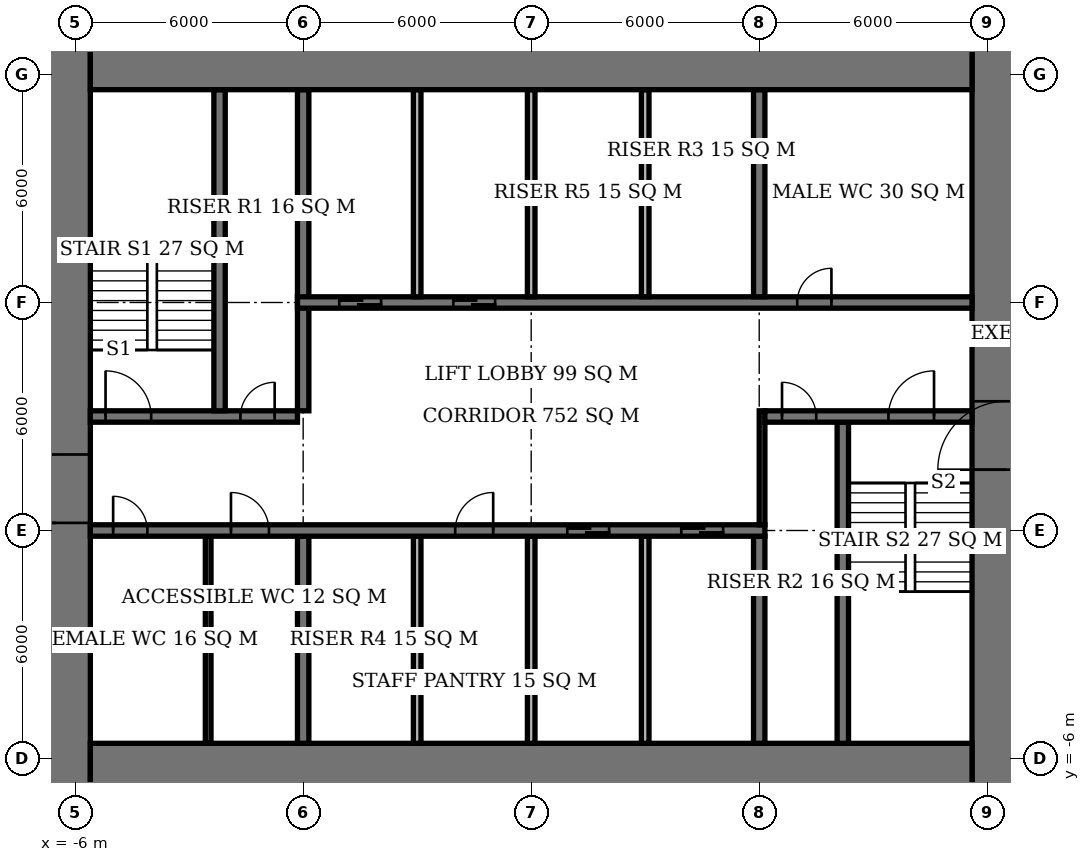
"""IFC4 building model, lengths in metres.
Left out: names, types, materials, properties, quantities, classifications, styles, units other than length and angle.
Written with IfcOpenShell. Run it as: python <this file> out.ifc"""

import sys

from ifc_helpers import new_model, si_unit, direction, frame, frame_2d, origin, place, context, subcontext, project, spatial, rectangle, extrude, element, fill, save


model = new_model("IFC4")
c1 = context("Model", 3, precision=1e-05, world=origin(), true_north=direction((0.0, 1.0)))
c2 = subcontext(c1, "Body", "Model", "MODEL_VIEW")
j1 = project(units=[si_unit("LENGTHUNIT", "METRE"), si_unit("PLANEANGLEUNIT", "RADIAN")], contexts=[c1])
p1 = place(None, origin())
s1 = spatial("IfcSite", under=j1, at=p1, CompositionType="ELEMENT")
p2 = place(p1, origin())
s2 = spatial("IfcBuilding", under=s1, at=p2, CompositionType="ELEMENT")
p3 = place(p2, frame((0.0, 0.0, 284.0)))
s3 = spatial("IfcBuildingStorey", under=s2, at=p3, CompositionType="ELEMENT", Elevation=284.0)
for number, where, z_axis, x_axis in (
    (1, (-5.6, -6.6, 0.0), (0.0, 0.0, 1.0), (1.0, 0.0, 0.0)),
    (2, (-5.6, 12.6, 0.0), (0.0, 0.0, 1.0), (1.0, 0.0, 0.0)),
):
    element("IfcWall", number, at=place(p3, frame(where, z_axis=z_axis, x_axis=x_axis)), inside=s3, PredefinedType="SHEAR", context=c2, shape_type="SweptSolid", body=[
        extrude(rectangle(XDim=23.2, YDim=2.0, at=frame_2d((11.6, 0.0))), origin(), (0.0, 0.0, 1.0), 3.9),
    ])
p4 = place(p3, frame((-6.5, -7.6, 0.0), z_axis=(0.0, 0.0, 1.0), x_axis=(0.0, 1.0, 0.0)))
e3 = element("IfcWall", 3, at=p4, inside=s3, PredefinedType="SHEAR", context=c2, shape_type="SweptSolid", body=[
    extrude(rectangle(XDim=21.2, YDim=1.8, at=frame_2d((10.6, 0.0))), origin(), (0.0, 0.0, 1.0), 3.9),
])
p5 = place(p4, frame((7.8, 0.0, 0.0)))
e4 = element("IfcOpeningElement", 4, at=p5, cuts=e3, PredefinedType="OPENING", context=c2, shape_type="SweptSolid", body=[
    extrude(rectangle(XDim=1.8, YDim=2.4, at=frame_2d((0.9, 1.2))), frame((0.0, 0.91, 0.0), z_axis=(0.0, -1.0, 0.0), x_axis=(1.0, 0.0, 0.0)), (0.0, 0.0, 1.0), 1.82),
])
p6 = place(p3, frame((18.5, -7.6, 0.0), z_axis=(0.0, 0.0, 1.0), x_axis=(0.0, 1.0, 0.0)))
e5 = element("IfcWall", 5, at=p6, inside=s3, PredefinedType="SHEAR", context=c2, shape_type="SweptSolid", body=[
    extrude(rectangle(XDim=21.2, YDim=1.8, at=frame_2d((10.6, 0.0))), origin(), (0.0, 0.0, 1.0), 3.9),
])
p7 = place(p6, frame((9.2, 0.0, 0.0)))
e6 = element("IfcOpeningElement", 6, at=p7, cuts=e5, PredefinedType="OPENING", context=c2, shape_type="SweptSolid", body=[
    extrude(rectangle(XDim=1.8, YDim=2.4, at=frame_2d((0.9, 1.2))), frame((0.0, 0.91, 0.0), z_axis=(0.0, -1.0, 0.0), x_axis=(1.0, 0.0, 0.0)), (0.0, 0.0, 1.0), 1.82),
])
p8 = place(p3, frame((-5.6, 0.0, 0.0), z_axis=(0.0, 0.0, 1.0), x_axis=(1.0, 0.0, 0.0)))
e7 = element("IfcWall", 7, at=p8, inside=s3, PredefinedType="SHEAR", context=c2, shape_type="SweptSolid", body=[
    extrude(rectangle(XDim=17.75, YDim=0.3, at=frame_2d((8.875, 0.0))), origin(), (0.0, 0.0, 1.0), 3.9),
])
p9 = place(p8, frame((0.6, 0.0, 0.0)))
e8 = element("IfcOpeningElement", 8, at=p9, cuts=e7, PredefinedType="OPENING", context=c2, shape_type="SweptSolid", body=[
    extrude(rectangle(XDim=0.9, YDim=2.1, at=frame_2d((0.45, 1.05))), frame((0.0, 0.16, 0.0), z_axis=(0.0, -1.0, 0.0), x_axis=(1.0, 0.0, 0.0)), (0.0, 0.0, 1.0), 0.32),
])
p10 = place(p8, frame((3.7, 0.0, 0.0)))
e9 = element("IfcOpeningElement", 9, at=p10, cuts=e7, PredefinedType="OPENING", context=c2, shape_type="SweptSolid", body=[
    extrude(rectangle(XDim=1.0, YDim=2.1, at=frame_2d((0.5, 1.05))), frame((0.0, 0.16, 0.0), z_axis=(0.0, -1.0, 0.0), x_axis=(1.0, 0.0, 0.0)), (0.0, 0.0, 1.0), 0.32),
])
p11 = place(p8, frame((9.6, 0.0, 0.0)))
e10 = element("IfcOpeningElement", 10, at=p11, cuts=e7, PredefinedType="OPENING", context=c2, shape_type="SweptSolid", body=[
    extrude(rectangle(XDim=1.0, YDim=2.1, at=frame_2d((0.5, 1.05))), frame((0.0, 0.16, 0.0), z_axis=(0.0, -1.0, 0.0), x_axis=(1.0, 0.0, 0.0)), (0.0, 0.0, 1.0), 0.32),
])
p12 = place(p8, frame((12.55, 0.0, 0.0)))
e11 = element("IfcOpeningElement", 11, at=p12, cuts=e7, PredefinedType="OPENING", context=c2, shape_type="SweptSolid", body=[
    extrude(rectangle(XDim=1.1, YDim=2.1, at=frame_2d((0.55, 1.05))), frame((0.0, 0.16, 0.0), z_axis=(0.0, -1.0, 0.0), x_axis=(1.0, 0.0, 0.0)), (0.0, 0.0, 1.0), 0.32),
])
p13 = place(p8, frame((15.55, 0.0, 0.0)))
e12 = element("IfcOpeningElement", 12, at=p13, cuts=e7, PredefinedType="OPENING", context=c2, shape_type="SweptSolid", body=[
    extrude(rectangle(XDim=1.1, YDim=2.1, at=frame_2d((0.55, 1.05))), frame((0.0, 0.16, 0.0), z_axis=(0.0, -1.0, 0.0), x_axis=(1.0, 0.0, 0.0)), (0.0, 0.0, 1.0), 0.32),
])
p14 = place(p3, frame((-5.6, 3.0, 0.0), z_axis=(0.0, 0.0, 1.0), x_axis=(1.0, 0.0, 0.0)))
e13 = element("IfcWall", 13, at=p14, inside=s3, PredefinedType="SHEAR", context=c2, shape_type="SweptSolid", body=[
    extrude(rectangle(XDim=5.45, YDim=0.3, at=frame_2d((2.725, 0.0))), origin(), (0.0, 0.0, 1.0), 3.9),
])
p15 = place(p14, frame((0.4, 0.0, 0.0)))
e14 = element("IfcOpeningElement", 14, at=p15, cuts=e13, PredefinedType="OPENING", context=c2, shape_type="SweptSolid", body=[
    extrude(rectangle(XDim=1.2, YDim=2.1, at=frame_2d((0.6, 1.05))), frame((0.0, 0.16, 0.0), z_axis=(0.0, -1.0, 0.0), x_axis=(1.0, 0.0, 0.0)), (0.0, 0.0, 1.0), 0.32),
])
p16 = place(p14, frame((3.95, 0.0, 0.0)))
e15 = element("IfcOpeningElement", 15, at=p16, cuts=e13, PredefinedType="OPENING", context=c2, shape_type="SweptSolid", body=[
    extrude(rectangle(XDim=0.9, YDim=2.1, at=frame_2d((0.45, 1.05))), frame((0.0, 0.16, 0.0), z_axis=(0.0, -1.0, 0.0), x_axis=(1.0, 0.0, 0.0)), (0.0, 0.0, 1.0), 0.32),
])
p17 = place(p3, frame((12.15, 3.0, 0.0), z_axis=(0.0, 0.0, 1.0), x_axis=(1.0, 0.0, 0.0)))
e16 = element("IfcWall", 16, at=p17, inside=s3, PredefinedType="SHEAR", context=c2, shape_type="SweptSolid", body=[
    extrude(rectangle(XDim=5.45, YDim=0.3, at=frame_2d((2.725, 0.0))), origin(), (0.0, 0.0, 1.0), 3.9),
])
p18 = place(p17, frame((3.25, 0.0, 0.0)))
e17 = element("IfcOpeningElement", 17, at=p18, cuts=e16, PredefinedType="OPENING", context=c2, shape_type="SweptSolid", body=[
    extrude(rectangle(XDim=1.2, YDim=2.1, at=frame_2d((0.6, 1.05))), frame((0.0, 0.16, 0.0), z_axis=(0.0, -1.0, 0.0), x_axis=(1.0, 0.0, 0.0)), (0.0, 0.0, 1.0), 0.32),
])
p19 = place(p17, frame((0.45, 0.0, 0.0)))
e18 = element("IfcOpeningElement", 18, at=p19, cuts=e16, PredefinedType="OPENING", context=c2, shape_type="SweptSolid", body=[
    extrude(rectangle(XDim=0.9, YDim=2.1, at=frame_2d((0.45, 1.05))), frame((0.0, 0.16, 0.0), z_axis=(0.0, -1.0, 0.0), x_axis=(1.0, 0.0, 0.0)), (0.0, 0.0, 1.0), 0.32),
])
p20 = place(p3, frame((-0.15, 6.0, 0.0), z_axis=(0.0, 0.0, 1.0), x_axis=(1.0, 0.0, 0.0)))
e19 = element("IfcWall", 19, at=p20, inside=s3, PredefinedType="SHEAR", context=c2, shape_type="SweptSolid", body=[
    extrude(rectangle(XDim=17.75, YDim=0.3, at=frame_2d((8.875, 0.0))), origin(), (0.0, 0.0, 1.0), 3.9),
])
p21 = place(p20, frame((13.15, 0.0, 0.0)))
e20 = element("IfcOpeningElement", 20, at=p21, cuts=e19, PredefinedType="OPENING", context=c2, shape_type="SweptSolid", body=[
    extrude(rectangle(XDim=0.9, YDim=2.1, at=frame_2d((0.45, 1.05))), frame((0.0, 0.16, 0.0), z_axis=(0.0, -1.0, 0.0), x_axis=(1.0, 0.0, 0.0)), (0.0, 0.0, 1.0), 0.32),
])
p22 = place(p20, frame((1.1, 0.0, 0.0)))
e21 = element("IfcOpeningElement", 21, at=p22, cuts=e19, PredefinedType="OPENING", context=c2, shape_type="SweptSolid", body=[
    extrude(rectangle(XDim=1.1, YDim=2.1, at=frame_2d((0.55, 1.05))), frame((0.0, 0.16, 0.0), z_axis=(0.0, -1.0, 0.0), x_axis=(1.0, 0.0, 0.0)), (0.0, 0.0, 1.0), 0.32),
])
p23 = place(p20, frame((4.1, 0.0, 0.0)))
e22 = element("IfcOpeningElement", 22, at=p23, cuts=e19, PredefinedType="OPENING", context=c2, shape_type="SweptSolid", body=[
    extrude(rectangle(XDim=1.1, YDim=2.1, at=frame_2d((0.55, 1.05))), frame((0.0, 0.16, 0.0), z_axis=(0.0, -1.0, 0.0), x_axis=(1.0, 0.0, 0.0)), (0.0, 0.0, 1.0), 0.32),
])
p24 = place(p3, frame((0.0, -5.6, 0.0), z_axis=(0.0, 0.0, 1.0), x_axis=(0.0, 1.0, 0.0)))
e23 = element("IfcWall", 23, at=p24, inside=s3, PredefinedType="SHEAR", context=c2, shape_type="SweptSolid", body=[
    extrude(rectangle(XDim=5.45, YDim=0.3, at=frame_2d((2.725, 0.0))), origin(), (0.0, 0.0, 1.0), 3.9),
])
p25 = place(p3, frame((0.0, 3.15, 0.0), z_axis=(0.0, 0.0, 1.0), x_axis=(0.0, 1.0, 0.0)))
e24 = element("IfcWall", 24, at=p25, inside=s3, PredefinedType="SHEAR", context=c2, shape_type="SweptSolid", body=[
    extrude(rectangle(XDim=8.45, YDim=0.3, at=frame_2d((4.225, 0.0))), origin(), (0.0, 0.0, 1.0), 3.9),
])
for number, where, z_axis, x_axis in (
    (25, (12.0, -5.6, 0.0), (0.0, 0.0, 1.0), (0.0, 1.0, 0.0)),
    (26, (12.0, 6.15, 0.0), (0.0, 0.0, 1.0), (0.0, 1.0, 0.0)),
):
    element("IfcWall", number, at=place(p3, frame(where, z_axis=z_axis, x_axis=x_axis)), inside=s3, PredefinedType="SHEAR", context=c2, shape_type="SweptSolid", body=[
        extrude(rectangle(XDim=5.45, YDim=0.3, at=frame_2d((2.725, 0.0))), origin(), (0.0, 0.0, 1.0), 3.9),
    ])
for number, where, z_axis, x_axis in (
    (27, (-2.2, 3.15, 0.0), (0.0, 0.0, 1.0), (0.0, 1.0, 0.0)),
    (28, (14.2, -5.6, 0.0), (0.0, 0.0, 1.0), (0.0, 1.0, 0.0)),
):
    element("IfcWall", number, at=place(p3, frame(where, z_axis=z_axis, x_axis=x_axis)), inside=s3, PredefinedType="SHEAR", context=c2, shape_type="SweptSolid", body=[
        extrude(rectangle(XDim=8.45, YDim=0.3, at=frame_2d((4.225, 0.0))), origin(), (0.0, 0.0, 1.0), 3.9),
    ])
for number, where, z_axis, x_axis in (
    (29, (3.0, 6.15, 0.0), (0.0, 0.0, 1.0), (0.0, 1.0, 0.0)),
    (30, (6.0, 6.15, 0.0), (0.0, 0.0, 1.0), (0.0, 1.0, 0.0)),
    (31, (9.0, 6.15, 0.0), (0.0, 0.0, 1.0), (0.0, 1.0, 0.0)),
    (32, (3.0, -5.6, 0.0), (0.0, 0.0, 1.0), (0.0, 1.0, 0.0)),
    (33, (6.0, -5.6, 0.0), (0.0, 0.0, 1.0), (0.0, 1.0, 0.0)),
    (34, (9.0, -5.6, 0.0), (0.0, 0.0, 1.0), (0.0, 1.0, 0.0)),
):
    element("IfcWall", number, at=place(p3, frame(where, z_axis=z_axis, x_axis=x_axis)), inside=s3, PredefinedType="SOLIDWALL", context=c2, shape_type="SweptSolid", body=[
        extrude(rectangle(XDim=5.45, YDim=0.2, at=frame_2d((2.725, 0.0))), origin(), (0.0, 0.0, 1.0), 3.9),
    ])
p26 = place(p3, frame((-2.5, -5.6, 0.0), z_axis=(0.0, 0.0, 1.0), x_axis=(0.0, 1.0, 0.0)))
e35 = element("IfcWall", 35, at=p26, inside=s3, PredefinedType="PLUMBINGWALL", context=c2, shape_type="SweptSolid", body=[
    extrude(rectangle(XDim=5.45, YDim=0.15, at=frame_2d((2.725, 0.0))), origin(), (0.0, 0.0, 1.0), 3.65),
])
p27 = place(p3, frame((12.075, 0.15, 0.0), z_axis=(0.0, 0.0, 1.0), x_axis=(0.0, 1.0, 0.0)))
e36 = element("IfcWall", 36, at=p27, inside=s3, PredefinedType="PARTITIONING", context=c2, shape_type="SweptSolid", body=[
    extrude(rectangle(XDim=3.0, YDim=0.15, at=frame_2d((1.5, 0.0))), origin(), (0.0, 0.0, 1.0), 3.65),
])
p28 = place(p5, origin())
e37 = element("IfcDoor", 37, at=p28, inside=s3, OperationType="DOUBLE_DOOR_SINGLE_SWING", PredefinedType="DOOR", context=c2, shape_type="SweptSolid", body=[
    extrude(rectangle(XDim=1.8, YDim=2.4, at=frame_2d((0.9, 1.2))), frame((0.0, 0.025, 0.0), z_axis=(0.0, -1.0, 0.0), x_axis=(1.0, 0.0, 0.0)), (0.0, 0.0, 1.0), 0.05),
])
fill(e4, e37)
p29 = place(p7, origin())
e38 = element("IfcDoor", 38, at=p29, inside=s3, OperationType="DOUBLE_DOOR_SINGLE_SWING", PredefinedType="DOOR", context=c2, shape_type="SweptSolid", body=[
    extrude(rectangle(XDim=1.8, YDim=2.4, at=frame_2d((0.9, 1.2))), frame((0.0, 0.025, 0.0), z_axis=(0.0, -1.0, 0.0), x_axis=(1.0, 0.0, 0.0)), (0.0, 0.0, 1.0), 0.05),
])
fill(e6, e38)
p30 = place(p15, origin())
e39 = element("IfcDoor", 39, at=p30, inside=s3, OperationType="SINGLE_SWING_LEFT", PredefinedType="DOOR", context=c2, shape_type="SweptSolid", body=[
    extrude(rectangle(XDim=1.2, YDim=2.1, at=frame_2d((0.6, 1.05))), frame((0.0, 0.025, 0.0), z_axis=(0.0, -1.0, 0.0), x_axis=(1.0, 0.0, 0.0)), (0.0, 0.0, 1.0), 0.05),
])
fill(e14, e39)
p31 = place(p16, origin())
e40 = element("IfcDoor", 40, at=p31, inside=s3, OperationType="SINGLE_SWING_RIGHT", PredefinedType="DOOR", context=c2, shape_type="SweptSolid", body=[
    extrude(rectangle(XDim=0.9, YDim=2.1, at=frame_2d((0.45, 1.05))), frame((0.0, 0.025, 0.0), z_axis=(0.0, -1.0, 0.0), x_axis=(1.0, 0.0, 0.0)), (0.0, 0.0, 1.0), 0.05),
])
fill(e15, e40)
p32 = place(p18, origin())
e41 = element("IfcDoor", 41, at=p32, inside=s3, OperationType="SINGLE_SWING_RIGHT", PredefinedType="DOOR", context=c2, shape_type="SweptSolid", body=[
    extrude(rectangle(XDim=1.2, YDim=2.1, at=frame_2d((0.6, 1.05))), frame((0.0, 0.025, 0.0), z_axis=(0.0, -1.0, 0.0), x_axis=(1.0, 0.0, 0.0)), (0.0, 0.0, 1.0), 0.05),
])
fill(e17, e41)
p33 = place(p19, origin())
e42 = element("IfcDoor", 42, at=p33, inside=s3, OperationType="SINGLE_SWING_LEFT", PredefinedType="DOOR", context=c2, shape_type="SweptSolid", body=[
    extrude(rectangle(XDim=0.9, YDim=2.1, at=frame_2d((0.45, 1.05))), frame((0.0, 0.025, 0.0), z_axis=(0.0, -1.0, 0.0), x_axis=(1.0, 0.0, 0.0)), (0.0, 0.0, 1.0), 0.05),
])
fill(e18, e42)
p34 = place(p9, origin())
e43 = element("IfcDoor", 43, at=p34, inside=s3, OperationType="SINGLE_SWING_LEFT", PredefinedType="DOOR", context=c2, shape_type="SweptSolid", body=[
    extrude(rectangle(XDim=0.9, YDim=2.1, at=frame_2d((0.45, 1.05))), frame((0.0, 0.025, 0.0), z_axis=(0.0, -1.0, 0.0), x_axis=(1.0, 0.0, 0.0)), (0.0, 0.0, 1.0), 0.05),
])
fill(e8, e43)
p35 = place(p10, origin())
e44 = element("IfcDoor", 44, at=p35, inside=s3, OperationType="SINGLE_SWING_LEFT", PredefinedType="DOOR", context=c2, shape_type="SweptSolid", body=[
    extrude(rectangle(XDim=1.0, YDim=2.1, at=frame_2d((0.5, 1.05))), frame((0.0, 0.025, 0.0), z_axis=(0.0, -1.0, 0.0), x_axis=(1.0, 0.0, 0.0)), (0.0, 0.0, 1.0), 0.05),
])
fill(e9, e44)
p36 = place(p21, origin())
e45 = element("IfcDoor", 45, at=p36, inside=s3, OperationType="SINGLE_SWING_RIGHT", PredefinedType="DOOR", context=c2, shape_type="SweptSolid", body=[
    extrude(rectangle(XDim=0.9, YDim=2.1, at=frame_2d((0.45, 1.05))), frame((0.0, 0.025, 0.0), z_axis=(0.0, -1.0, 0.0), x_axis=(1.0, 0.0, 0.0)), (0.0, 0.0, 1.0), 0.05),
])
fill(e20, e45)
p37 = place(p11, origin())
e46 = element("IfcDoor", 46, at=p37, inside=s3, OperationType="SINGLE_SWING_RIGHT", PredefinedType="DOOR", context=c2, shape_type="SweptSolid", body=[
    extrude(rectangle(XDim=1.0, YDim=2.1, at=frame_2d((0.5, 1.05))), frame((0.0, 0.025, 0.0), z_axis=(0.0, -1.0, 0.0), x_axis=(1.0, 0.0, 0.0)), (0.0, 0.0, 1.0), 0.05),
])
fill(e10, e46)
p38 = place(p22, origin())
e47 = element("IfcDoor", 47, at=p38, inside=s3, OperationType="DOUBLE_DOOR_SLIDING", PredefinedType="USERDEFINED", context=c2, shape_type="SweptSolid", body=[
    extrude(rectangle(XDim=1.1, YDim=2.1, at=frame_2d((0.55, 1.05))), frame((0.0, 0.025, 0.0), z_axis=(0.0, -1.0, 0.0), x_axis=(1.0, 0.0, 0.0)), (0.0, 0.0, 1.0), 0.05),
])
fill(e21, e47)
p39 = place(p23, origin())
e48 = element("IfcDoor", 48, at=p39, inside=s3, OperationType="DOUBLE_DOOR_SLIDING", PredefinedType="USERDEFINED", context=c2, shape_type="SweptSolid", body=[
    extrude(rectangle(XDim=1.1, YDim=2.1, at=frame_2d((0.55, 1.05))), frame((0.0, 0.025, 0.0), z_axis=(0.0, -1.0, 0.0), x_axis=(1.0, 0.0, 0.0)), (0.0, 0.0, 1.0), 0.05),
])
fill(e22, e48)
p40 = place(p12, origin())
e49 = element("IfcDoor", 49, at=p40, inside=s3, OperationType="DOUBLE_DOOR_SLIDING", PredefinedType="USERDEFINED", context=c2, shape_type="SweptSolid", body=[
    extrude(rectangle(XDim=1.1, YDim=2.1, at=frame_2d((0.55, 1.05))), frame((0.0, 0.025, 0.0), z_axis=(0.0, -1.0, 0.0), x_axis=(1.0, 0.0, 0.0)), (0.0, 0.0, 1.0), 0.05),
])
fill(e11, e49)
p41 = place(p13, origin())
e50 = element("IfcDoor", 50, at=p41, inside=s3, OperationType="DOUBLE_DOOR_SLIDING", PredefinedType="USERDEFINED", context=c2, shape_type="SweptSolid", body=[
    extrude(rectangle(XDim=1.1, YDim=2.1, at=frame_2d((0.55, 1.05))), frame((0.0, 0.025, 0.0), z_axis=(0.0, -1.0, 0.0), x_axis=(1.0, 0.0, 0.0)), (0.0, 0.0, 1.0), 0.05),
])
fill(e12, e50)
save(model, sys.argv[1])
